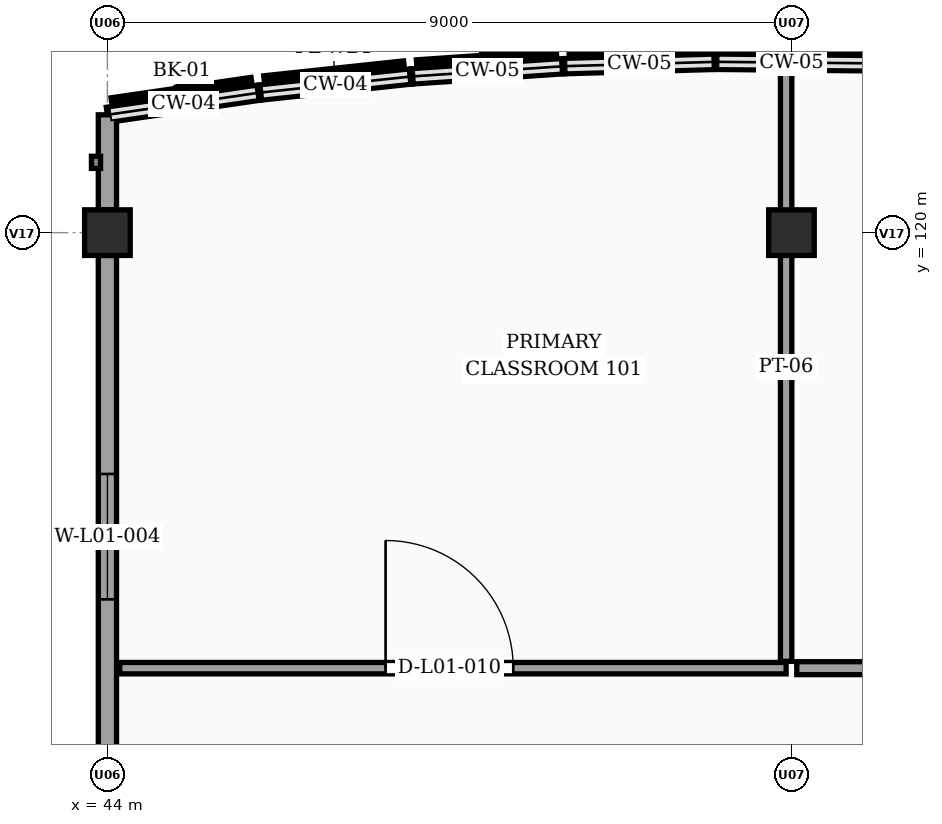
"""IFC4 building model, lengths in metres.
Left out: names, types, materials, properties, quantities, classifications, styles, units other than length and angle.
Written with IfcOpenShell. Run it as: python <this file> out.ifc"""

import sys

from ifc_helpers import new_model, si_unit, direction, frame, frame_2d, origin, origin_2d, place, context, subcontext, project, spatial, rectangle, extrude, element, fill, save


model = new_model("IFC4")
c1 = context("Model", 3, precision=1e-05, world=origin(), true_north=direction((0.0, 1.0)))
c2 = subcontext(c1, "Body", "Model", "MODEL_VIEW")
j1 = project(units=[si_unit("LENGTHUNIT", "METRE"), si_unit("PLANEANGLEUNIT", "RADIAN")], contexts=[c1])
p1 = place(None, origin())
s1 = spatial("IfcSite", under=j1, at=p1, CompositionType="ELEMENT")
p2 = place(p1, origin())
s2 = spatial("IfcBuilding", under=s1, at=p2, CompositionType="ELEMENT")
p3 = place(p2, frame((0.0, 0.0, 4.5)))
s3 = spatial("IfcBuildingStorey", under=s2, at=p3, CompositionType="ELEMENT", Elevation=4.5)
for number, where, z_axis, x_axis in (
    (1, (44.0, 120.0, 0.0), (0.0, 0.0, 1.0), (1.0, 0.0, 0.0)),
    (2, (53.0, 120.0, 0.0), (0.0, 0.0, 1.0), (1.0, 0.0, 0.0)),
):
    element("IfcColumn", number, at=place(p3, frame(where, z_axis=z_axis, x_axis=x_axis)), inside=s3, PredefinedType="COLUMN", context=c2, shape_type="SweptSolid", body=[
        extrude(rectangle(XDim=0.6, YDim=0.6, at=origin_2d()), origin(), (0.0, 0.0, 1.0), 3.9),
    ])
p4 = place(p3, frame((44.0, 121.55, 0.0), z_axis=(0.0, 0.0, 1.0), x_axis=(0.989544477223, 0.144228040259, 0.0)))
e3 = element("IfcWall", 3, at=p4, inside=s3, PredefinedType="SOLIDWALL", context=c2, shape_type="SweptSolid", body=[
    extrude(rectangle(XDim=2.021, YDim=0.2, at=frame_2d((1.011, 0.0))), origin(), (0.0, 0.0, 1.0), 0.95),
])
p5 = place(p3, frame((46.0, 121.842, 0.0), z_axis=(0.0, 0.0, 1.0), x_axis=(0.994395160059, 0.105727317433, 0.0)))
e4 = element("IfcWall", 4, at=p5, inside=s3, PredefinedType="SOLIDWALL", context=c2, shape_type="SweptSolid", body=[
    extrude(rectangle(XDim=2.011, YDim=0.2, at=frame_2d((1.006, 0.0))), origin(), (0.0, 0.0, 1.0), 0.95),
])
p6 = place(p3, frame((48.0, 122.054, 0.0), z_axis=(0.0, 0.0, 1.0), x_axis=(0.997729302978, 0.067351599676, 0.0)))
e5 = element("IfcWall", 5, at=p6, inside=s3, PredefinedType="SOLIDWALL", context=c2, shape_type="SweptSolid", body=[
    extrude(rectangle(XDim=2.005, YDim=0.2, at=frame_2d((1.002, 0.0))), origin(), (0.0, 0.0, 1.0), 0.95),
])
p7 = place(p3, frame((50.0, 122.189, 0.0), z_axis=(0.0, 0.0, 1.0), x_axis=(0.999581770858, 0.028918564416, 0.0)))
e6 = element("IfcWall", 6, at=p7, inside=s3, PredefinedType="SOLIDWALL", context=c2, shape_type="SweptSolid", body=[
    extrude(rectangle(XDim=2.001, YDim=0.2, at=frame_2d((1.0, 0.0))), origin(), (0.0, 0.0, 1.0), 0.95),
])
p8 = place(p3, frame((52.0, 122.247, 0.0), z_axis=(0.0, 0.0, 1.0), x_axis=(0.999953504169, -0.009643106302, 0.0)))
e7 = element("IfcWall", 7, at=p8, inside=s3, PredefinedType="SOLIDWALL", context=c2, shape_type="SweptSolid", body=[
    extrude(rectangle(XDim=2.0, YDim=0.2, at=frame_2d((1.0, 0.0))), origin(), (0.0, 0.0, 1.0), 0.95),
])
p9 = place(p3, frame((44.0, 112.3, 0.0), z_axis=(0.0, 0.0, 1.0), x_axis=(0.0, 1.0, 0.0)))
e8 = element("IfcWall", 8, at=p9, inside=s3, PredefinedType="SOLIDWALL", context=c2, shape_type="SweptSolid", body=[
    extrude(rectangle(XDim=7.4, YDim=0.24, at=frame_2d((3.7, 0.0))), origin(), (0.0, 0.0, 1.0), 2.945),
])
p10 = place(p9, frame((2.875, 0.0, 0.95)))
e9 = element("IfcOpeningElement", 9, at=p10, cuts=e8, PredefinedType="OPENING", context=c2, shape_type="SweptSolid", body=[
    extrude(rectangle(XDim=1.65, YDim=1.5, at=frame_2d((0.825, 0.75))), frame((0.0, 0.13, 0.0), z_axis=(0.0, -1.0, 0.0), x_axis=(1.0, 0.0, 0.0)), (0.0, 0.0, 1.0), 0.26),
])
p11 = place(p3, frame((44.0, 120.3, 0.0), z_axis=(0.0, 0.0, 1.0), x_axis=(0.0, 1.0, 0.0)))
e10 = element("IfcWall", 10, at=p11, inside=s3, PredefinedType="SOLIDWALL", context=c2, shape_type="SweptSolid", body=[
    extrude(rectangle(XDim=1.25, YDim=0.24, at=frame_2d((0.625, 0.0))), origin(), (0.0, 0.0, 1.0), 2.945),
])
p12 = place(p3, frame((44.162, 114.27, 0.0), z_axis=(0.0, 0.0, 1.0), x_axis=(1.0, 0.0, 0.0)))
e11 = element("IfcWall", 11, at=p12, inside=s3, PredefinedType="PARTITIONING", context=c2, shape_type="SweptSolid", body=[
    extrude(rectangle(XDim=8.768, YDim=0.15, at=frame_2d((4.384, 0.0))), origin(), (0.0, 0.0, 1.0), 3.65),
])
p13 = place(p12, frame((3.498, 0.0, 0.0)))
e12 = element("IfcOpeningElement", 12, at=p13, cuts=e11, PredefinedType="OPENING", context=c2, shape_type="SweptSolid", body=[
    extrude(rectangle(XDim=1.68, YDim=2.2, at=frame_2d((0.84, 1.1))), frame((0.0, 0.085, 0.0), z_axis=(0.0, -1.0, 0.0), x_axis=(1.0, 0.0, 0.0)), (0.0, 0.0, 1.0), 0.17),
])
p14 = place(p3, frame((52.93, 114.36, 0.0), z_axis=(0.0, 0.0, 1.0), x_axis=(0.0, 1.0, 0.0)))
e13 = element("IfcWall", 13, at=p14, inside=s3, PredefinedType="PARTITIONING", context=c2, shape_type="SweptSolid", body=[
    extrude(rectangle(XDim=7.736, YDim=0.15, at=frame_2d((3.868, 0.0))), origin(), (0.0, 0.0, 1.0), 2.995),
])
p15 = place(p3, frame((53.07, 114.27, 0.0), z_axis=(0.0, 0.0, 1.0), x_axis=(1.0, 0.0, 0.0)))
e14 = element("IfcWall", 14, at=p15, inside=s3, PredefinedType="PARTITIONING", context=c2, shape_type="SweptSolid", body=[
    extrude(rectangle(XDim=11.86, YDim=0.17, at=frame_2d((5.93, 0.0))), origin(), (0.0, 0.0, 1.0), 3.65),
])
p16 = place(p15, frame((4.55, 0.0, 0.0)))
e15 = element("IfcOpeningElement", 15, at=p16, cuts=e14, PredefinedType="OPENING", context=c2, shape_type="SweptSolid", body=[
    extrude(rectangle(XDim=1.76, YDim=2.2, at=frame_2d((0.88, 1.1))), frame((0.0, 0.095, 0.0), z_axis=(0.0, -1.0, 0.0), x_axis=(1.0, 0.0, 0.0)), (0.0, 0.0, 1.0), 0.19),
])
p17 = place(p10, origin())
e16 = element("IfcWindow", 16, at=p17, inside=s3, PartitioningType="DOUBLE_PANEL_VERTICAL", PredefinedType="WINDOW", context=c2, shape_type="SweptSolid", body=[
    extrude(rectangle(XDim=1.65, YDim=1.5, at=frame_2d((0.825, 0.75))), frame((0.0, 0.03, 0.0), z_axis=(0.0, -1.0, 0.0), x_axis=(1.0, 0.0, 0.0)), (0.0, 0.0, 1.0), 0.06),
])
fill(e9, e16)
p18 = place(p13, origin())
e17 = element("IfcDoor", 17, at=p18, inside=s3, OperationType="SINGLE_SWING_LEFT", PredefinedType="DOOR", context=c2, shape_type="SweptSolid", body=[
    extrude(rectangle(XDim=1.68, YDim=2.2, at=frame_2d((0.84, 1.1))), frame((0.0, 0.025, 0.0), z_axis=(0.0, -1.0, 0.0), x_axis=(1.0, 0.0, 0.0)), (0.0, 0.0, 1.0), 0.05),
])
fill(e12, e17)
save(model, sys.argv[1])
